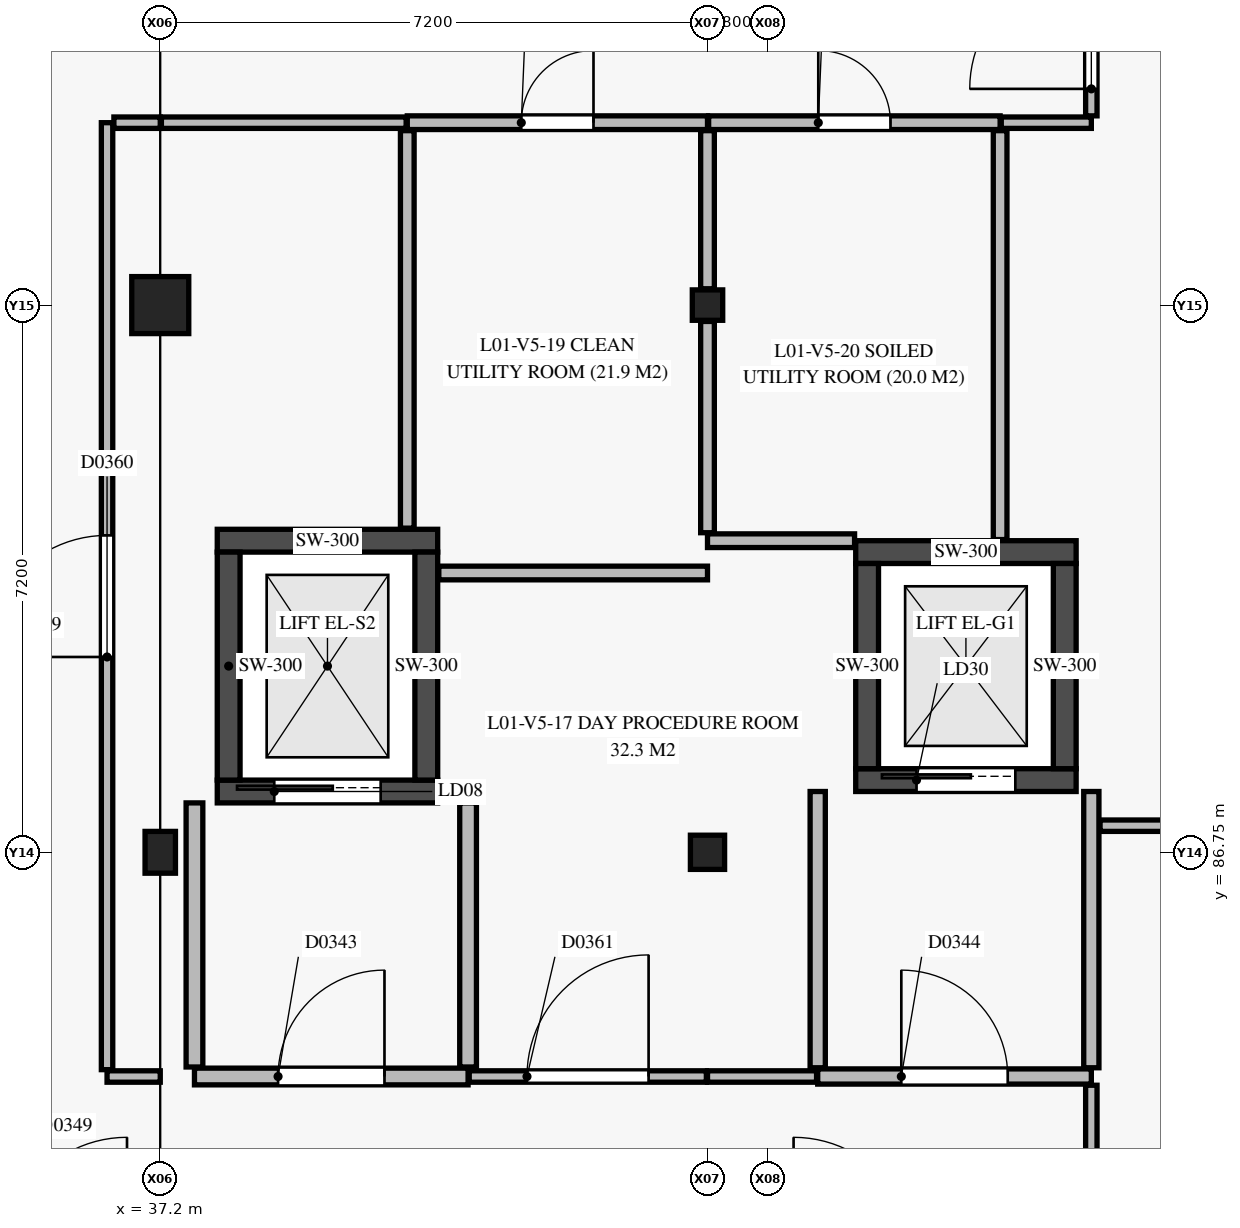
"""IFC4 building model, lengths in metres.
Left out: names, types, materials, properties, quantities, classifications, styles, units other than length and angle.
Written with IfcOpenShell. Run it as: python <this file> out.ifc"""

import sys

from ifc_helpers import new_model, si_unit, direction, frame, frame_2d, origin, origin_2d, place, context, subcontext, project, spatial, rectangle, extrude, element, fill, save


model = new_model("IFC4")
c1 = context("Model", 3, precision=1e-05, world=origin(), true_north=direction((0.0, 1.0)))
c2 = subcontext(c1, "Body", "Model", "MODEL_VIEW")
j1 = project(units=[si_unit("LENGTHUNIT", "METRE"), si_unit("PLANEANGLEUNIT", "RADIAN")], contexts=[c1])
p1 = place(None, origin())
s1 = spatial("IfcSite", under=j1, at=p1, CompositionType="ELEMENT")
p2 = place(p1, origin())
s2 = spatial("IfcBuilding", under=s1, at=p2, CompositionType="ELEMENT")
p3 = place(p2, frame((0.0, 0.0, 4.8)))
s3 = spatial("IfcBuildingStorey", under=s2, at=p3, CompositionType="ELEMENT", Elevation=4.8)
p4 = place(p3, frame((37.2, 86.75, 0.0), z_axis=(0.0, 0.0, 1.0), x_axis=(1.0, 0.0, 0.0)))
e1 = element("IfcColumn", 1, at=p4, inside=s3, PredefinedType="COLUMN", context=c2, shape_type="SweptSolid", body=[
    extrude(rectangle(XDim=0.4, YDim=0.55, at=origin_2d()), origin(), (0.0, 0.0, 1.0), 4.2),
])
p5 = place(p3, frame((37.2, 93.95, 0.0), z_axis=(0.0, 0.0, 1.0), x_axis=(1.0, 0.0, 0.0)))
e2 = element("IfcColumn", 2, at=p5, inside=s3, PredefinedType="COLUMN", context=c2, shape_type="SweptSolid", body=[
    extrude(rectangle(XDim=0.75, YDim=0.75, at=origin_2d()), origin(), (0.0, 0.0, 1.0), 4.2),
])
p6 = place(p3, frame((44.4, 86.75, 0.0), z_axis=(0.0, 0.0, 1.0), x_axis=(1.0, 0.0, 0.0)))
e3 = element("IfcColumn", 3, at=p6, inside=s3, PredefinedType="COLUMN", context=c2, shape_type="SweptSolid", body=[
    extrude(rectangle(XDim=0.45, YDim=0.45, at=origin_2d()), origin(), (0.0, 0.0, 1.0), 4.2),
])
p7 = place(p3, frame((44.4, 93.95, 0.0), z_axis=(0.0, 0.0, 1.0), x_axis=(1.0, 0.0, 0.0)))
e4 = element("IfcColumn", 4, at=p7, inside=s3, PredefinedType="COLUMN", context=c2, shape_type="SweptSolid", body=[
    extrude(rectangle(XDim=0.4, YDim=0.4, at=origin_2d()), origin(), (0.0, 0.0, 1.0), 4.2),
])
p8 = place(p3, frame((37.95, 87.55, 0.0), z_axis=(0.0, 0.0, 1.0), x_axis=(1.0, 0.0, 0.0)))
e5 = element("IfcWall", 5, at=p8, inside=s3, PredefinedType="SHEAR", context=c2, shape_type="SweptSolid", body=[
    extrude(rectangle(XDim=2.9, YDim=0.3, at=frame_2d((1.45, 0.0))), origin(), (0.0, 0.0, 1.0), 3.95),
])
p9 = place(p8, frame((0.75, 0.0, 0.0)))
e6 = element("IfcOpeningElement", 6, at=p9, cuts=e5, PredefinedType="OPENING", context=c2, shape_type="SweptSolid", body=[
    extrude(rectangle(XDim=1.4, YDim=2.15, at=frame_2d((0.7, 1.075))), frame((0.0, 0.16, 0.0), z_axis=(0.0, -1.0, 0.0), x_axis=(1.0, 0.0, 0.0)), (0.0, 0.0, 1.0), 0.32),
])
p10 = place(p3, frame((37.95, 90.85, 0.0), z_axis=(0.0, 0.0, 1.0), x_axis=(1.0, 0.0, 0.0)))
e7 = element("IfcWall", 7, at=p10, inside=s3, PredefinedType="SHEAR", context=c2, shape_type="SweptSolid", body=[
    extrude(rectangle(XDim=2.9, YDim=0.3, at=frame_2d((1.45, 0.0))), origin(), (0.0, 0.0, 1.0), 3.95),
])
for number, where, z_axis, x_axis in (
    (8, (38.1, 87.7, 0.0), (0.0, 0.0, 1.0), (0.0, 1.0, 0.0)),
    (9, (40.7, 87.7, 0.0), (0.0, 0.0, 1.0), (0.0, 1.0, 0.0)),
):
    element("IfcWall", number, at=place(p3, frame(where, z_axis=z_axis, x_axis=x_axis)), inside=s3, PredefinedType="SHEAR", context=c2, shape_type="SweptSolid", body=[
        extrude(rectangle(XDim=3.0, YDim=0.3, at=frame_2d((1.5, 0.0))), origin(), (0.0, 0.0, 1.0), 3.95),
    ])
p11 = place(p3, frame((46.35, 87.7, 0.0), z_axis=(0.0, 0.0, 1.0), x_axis=(1.0, 0.0, 0.0)))
e10 = element("IfcWall", 10, at=p11, inside=s3, PredefinedType="SHEAR", context=c2, shape_type="SweptSolid", body=[
    extrude(rectangle(XDim=2.9, YDim=0.3, at=frame_2d((1.45, 0.0))), origin(), (0.0, 0.0, 1.0), 3.95),
])
p12 = place(p11, frame((0.8, 0.0, 0.0)))
e11 = element("IfcOpeningElement", 11, at=p12, cuts=e10, PredefinedType="OPENING", context=c2, shape_type="SweptSolid", body=[
    extrude(rectangle(XDim=1.3, YDim=2.15, at=frame_2d((0.65, 1.075))), frame((0.0, 0.16, 0.0), z_axis=(0.0, -1.0, 0.0), x_axis=(1.0, 0.0, 0.0)), (0.0, 0.0, 1.0), 0.32),
])
p13 = place(p3, frame((46.35, 90.7, 0.0), z_axis=(0.0, 0.0, 1.0), x_axis=(1.0, 0.0, 0.0)))
e12 = element("IfcWall", 12, at=p13, inside=s3, PredefinedType="SHEAR", context=c2, shape_type="SweptSolid", body=[
    extrude(rectangle(XDim=2.9, YDim=0.3, at=frame_2d((1.45, 0.0))), origin(), (0.0, 0.0, 1.0), 3.95),
])
for number, where, z_axis, x_axis in (
    (13, (46.5, 87.85, 0.0), (0.0, 0.0, 1.0), (0.0, 1.0, 0.0)),
    (14, (49.1, 87.85, 0.0), (0.0, 0.0, 1.0), (0.0, 1.0, 0.0)),
):
    element("IfcWall", number, at=place(p3, frame(where, z_axis=z_axis, x_axis=x_axis)), inside=s3, PredefinedType="SHEAR", context=c2, shape_type="SweptSolid", body=[
        extrude(rectangle(XDim=2.7, YDim=0.3, at=frame_2d((1.35, 0.0))), origin(), (0.0, 0.0, 1.0), 3.95),
    ])
p14 = place(p3, frame((37.65, 83.8, 0.0), z_axis=(0.0, 0.0, 1.0), x_axis=(1.0, 0.0, 0.0)))
e15 = element("IfcWall", 15, at=p14, inside=s3, PredefinedType="PARTITIONING", context=c2, shape_type="SweptSolid", body=[
    extrude(rectangle(XDim=3.6, YDim=0.22, at=frame_2d((1.8, 0.0))), origin(), (0.0, 0.0, 1.0), 3.95),
])
p15 = place(p14, frame((1.1, 0.0, 0.0)))
e16 = element("IfcOpeningElement", 16, at=p15, cuts=e15, PredefinedType="OPENING", context=c2, shape_type="SweptSolid", body=[
    extrude(rectangle(XDim=1.4, YDim=2.2, at=frame_2d((0.7, 1.1))), frame((0.0, 0.12, 0.0), z_axis=(0.0, -1.0, 0.0), x_axis=(1.0, 0.0, 0.0)), (0.0, 0.0, 1.0), 0.24),
])
p16 = place(p3, frame((45.85, 83.8, 0.0), z_axis=(0.0, 0.0, 1.0), x_axis=(1.0, 0.0, 0.0)))
e17 = element("IfcWall", 17, at=p16, inside=s3, PredefinedType="PARTITIONING", context=c2, shape_type="SweptSolid", body=[
    extrude(rectangle(XDim=3.6, YDim=0.2, at=frame_2d((1.8, 0.0))), origin(), (0.0, 0.0, 1.0), 3.95),
])
p17 = place(p16, frame((1.1, 0.0, 0.0)))
e18 = element("IfcOpeningElement", 18, at=p17, cuts=e17, PredefinedType="OPENING", context=c2, shape_type="SweptSolid", body=[
    extrude(rectangle(XDim=1.4, YDim=2.2, at=frame_2d((0.7, 1.1))), frame((0.0, 0.11, 0.0), z_axis=(0.0, -1.0, 0.0), x_axis=(1.0, 0.0, 0.0)), (0.0, 0.0, 1.0), 0.22),
])
for number, where, z_axis, x_axis in (
    (19, (41.25, 83.925, 0.0), (0.0, 0.0, 1.0), (0.0, 1.0, 0.0)),
    (20, (37.65, 83.925, 0.0), (0.0, 0.0, 1.0), (0.0, 1.0, 0.0)),
):
    element("IfcWall", number, at=place(p3, frame(where, z_axis=z_axis, x_axis=x_axis)), inside=s3, PredefinedType="PARTITIONING", context=c2, shape_type="SweptSolid", body=[
        extrude(rectangle(XDim=3.475, YDim=0.22, at=frame_2d((1.737, 0.0))), origin(), (0.0, 0.0, 1.0), 3.135),
    ])
for number, where, z_axis, x_axis in (
    (21, (49.45, 83.915, 0.0), (0.0, 0.0, 1.0), (0.0, 1.0, 0.0)),
    (22, (45.85, 83.915, 0.0), (0.0, 0.0, 1.0), (0.0, 1.0, 0.0)),
):
    element("IfcWall", number, at=place(p3, frame(where, z_axis=z_axis, x_axis=x_axis)), inside=s3, PredefinedType="PARTITIONING", context=c2, shape_type="SweptSolid", body=[
        extrude(rectangle(XDim=3.635, YDim=0.2, at=frame_2d((1.817, 0.0))), origin(), (0.0, 0.0, 1.0), 3.235),
    ])
p18 = place(p3, frame((40.45, 96.35, 0.0), z_axis=(0.0, 0.0, 1.0), x_axis=(1.0, 0.0, 0.0)))
e23 = element("IfcWall", 23, at=p18, inside=s3, PredefinedType="PLUMBINGWALL", context=c2, shape_type="SweptSolid", body=[
    extrude(rectangle(XDim=3.95, YDim=0.18, at=frame_2d((1.975, 0.0))), origin(), (0.0, 0.0, 1.0), 3.235),
])
p19 = place(p18, frame((1.5, 0.0, 0.0)))
e24 = element("IfcOpeningElement", 24, at=p19, cuts=e23, PredefinedType="OPENING", context=c2, shape_type="SweptSolid", body=[
    extrude(rectangle(XDim=0.95, YDim=2.1, at=frame_2d((0.475, 1.05))), frame((0.0, 0.1, 0.0), z_axis=(0.0, -1.0, 0.0), x_axis=(1.0, 0.0, 0.0)), (0.0, 0.0, 1.0), 0.2),
])
p20 = place(p3, frame((44.415, 96.35, 0.0), z_axis=(0.0, 0.0, 1.0), x_axis=(1.0, 0.0, 0.0)))
e25 = element("IfcWall", 25, at=p20, inside=s3, PredefinedType="PLUMBINGWALL", context=c2, shape_type="SweptSolid", body=[
    extrude(rectangle(XDim=3.835, YDim=0.18, at=frame_2d((1.917, 0.0))), origin(), (0.0, 0.0, 1.0), 3.235),
])
p21 = place(p20, frame((1.442, 0.0, 0.0)))
e26 = element("IfcOpeningElement", 26, at=p21, cuts=e25, PredefinedType="OPENING", context=c2, shape_type="SweptSolid", body=[
    extrude(rectangle(XDim=0.95, YDim=2.1, at=frame_2d((0.475, 1.05))), frame((0.0, 0.1, 0.0), z_axis=(0.0, -1.0, 0.0), x_axis=(1.0, 0.0, 0.0)), (0.0, 0.0, 1.0), 0.2),
])
p22 = place(p3, frame((49.45, 81.49, 0.0), z_axis=(0.0, 0.0, 1.0), x_axis=(0.0, 1.0, 0.0)))
e27 = element("IfcWall", 27, at=p22, inside=s3, PredefinedType="PARTITIONING", context=c2, shape_type="SweptSolid", body=[
    extrude(rectangle(XDim=2.195, YDim=0.15, at=frame_2d((1.098, 0.0))), origin(), (0.0, 0.0, 1.0), 3.515),
])
p23 = place(p3, frame((36.5, 83.8, 0.0), z_axis=(0.0, 0.0, 1.0), x_axis=(1.0, 0.0, 0.0)))
e28 = element("IfcWall", 28, at=p23, inside=s3, PredefinedType="PARTITIONING", context=c2, shape_type="SweptSolid", body=[
    extrude(rectangle(XDim=0.7, YDim=0.15, at=frame_2d((0.35, 0.0))), origin(), (0.0, 0.0, 1.0), 3.235),
])
p24 = place(p3, frame((36.5, 83.89, 0.0), z_axis=(0.0, 0.0, 1.0), x_axis=(0.0, 1.0, 0.0)))
e29 = element("IfcWall", 29, at=p24, inside=s3, PredefinedType="PARTITIONING", context=c2, shape_type="SweptSolid", body=[
    extrude(rectangle(XDim=12.46, YDim=0.15, at=frame_2d((6.23, 0.0))), origin(), (0.0, 0.0, 1.0), 3.235),
])
p25 = place(p24, frame((5.43, 0.0, 0.0)))
e30 = element("IfcOpeningElement", 30, at=p25, cuts=e29, PredefinedType="OPENING", context=c2, shape_type="SweptSolid", body=[
    extrude(rectangle(XDim=1.6, YDim=2.25, at=frame_2d((0.8, 1.125))), frame((0.0, 0.085, 0.0), z_axis=(0.0, -1.0, 0.0), x_axis=(1.0, 0.0, 0.0)), (0.0, 0.0, 1.0), 0.17),
])
p26 = place(p3, frame((36.59, 96.35, 0.0), z_axis=(0.0, 0.0, 1.0), x_axis=(1.0, 0.0, 0.0)))
e31 = element("IfcWall", 31, at=p26, inside=s3, PredefinedType="PARTITIONING", context=c2, shape_type="SweptSolid", body=[
    extrude(rectangle(XDim=0.61, YDim=0.15, at=frame_2d((0.305, 0.0))), origin(), (0.0, 0.0, 1.0), 3.355),
])
p27 = place(p3, frame((37.215, 96.35, 0.0), z_axis=(0.0, 0.0, 1.0), x_axis=(1.0, 0.0, 0.0)))
e32 = element("IfcWall", 32, at=p27, inside=s3, PredefinedType="PARTITIONING", context=c2, shape_type="SweptSolid", body=[
    extrude(rectangle(XDim=3.22, YDim=0.15, at=frame_2d((1.61, 0.0))), origin(), (0.0, 0.0, 1.0), 3.355),
])
p28 = place(p3, frame((44.4, 83.8, 0.0), z_axis=(0.0, 0.0, 1.0), x_axis=(1.0, 0.0, 0.0)))
e33 = element("IfcWall", 33, at=p28, inside=s3, PredefinedType="PARTITIONING", context=c2, shape_type="SweptSolid", body=[
    extrude(rectangle(XDim=1.435, YDim=0.15, at=frame_2d((0.718, 0.0))), origin(), (0.0, 0.0, 1.0), 3.385),
])
p29 = place(p3, frame((41.265, 83.8, 0.0), z_axis=(0.0, 0.0, 1.0), x_axis=(1.0, 0.0, 0.0)))
e34 = element("IfcWall", 34, at=p29, inside=s3, PredefinedType="PARTITIONING", context=c2, shape_type="SweptSolid", body=[
    extrude(rectangle(XDim=3.12, YDim=0.15, at=frame_2d((1.56, 0.0))), origin(), (0.0, 0.0, 1.0), 3.385),
])
p30 = place(p29, frame((0.76, 0.0, 0.0)))
e35 = element("IfcOpeningElement", 35, at=p30, cuts=e34, PredefinedType="OPENING", context=c2, shape_type="SweptSolid", body=[
    extrude(rectangle(XDim=1.6, YDim=2.25, at=frame_2d((0.8, 1.125))), frame((0.0, 0.085, 0.0), z_axis=(0.0, -1.0, 0.0), x_axis=(1.0, 0.0, 0.0)), (0.0, 0.0, 1.0), 0.17),
])
p31 = place(p3, frame((48.265, 96.35, 0.0), z_axis=(0.0, 0.0, 1.0), x_axis=(1.0, 0.0, 0.0)))
e36 = element("IfcWall", 36, at=p31, inside=s3, PredefinedType="PARTITIONING", context=c2, shape_type="SweptSolid", body=[
    extrude(rectangle(XDim=1.185, YDim=0.15, at=frame_2d((0.593, 0.0))), origin(), (0.0, 0.0, 1.0), 3.515),
])
p32 = place(p3, frame((49.45, 96.44, 0.0), z_axis=(0.0, 0.0, 1.0), x_axis=(0.0, 1.0, 0.0)))
e37 = element("IfcWall", 37, at=p32, inside=s3, PredefinedType="PARTITIONING", context=c2, shape_type="SweptSolid", body=[
    extrude(rectangle(XDim=2.31, YDim=0.15, at=frame_2d((1.155, 0.0))), origin(), (0.0, 0.0, 1.0), 3.475),
])
p33 = place(p32, frame((0.355, 0.0, 0.0)))
e38 = element("IfcOpeningElement", 38, at=p33, cuts=e37, PredefinedType="OPENING", context=c2, shape_type="SweptSolid", body=[
    extrude(rectangle(XDim=1.6, YDim=2.25, at=frame_2d((0.8, 1.125))), frame((0.0, 0.085, 0.0), z_axis=(0.0, -1.0, 0.0), x_axis=(1.0, 0.0, 0.0)), (0.0, 0.0, 1.0), 0.17),
])
p34 = place(p3, frame((40.45, 91.015, 0.0), z_axis=(0.0, 0.0, 1.0), x_axis=(0.0, 1.0, 0.0)))
e39 = element("IfcWall", 39, at=p34, inside=s3, PredefinedType="PLUMBINGWALL", context=c2, shape_type="SweptSolid", body=[
    extrude(rectangle(XDim=5.23, YDim=0.18, at=frame_2d((2.615, 0.0))), origin(), (0.0, 0.0, 1.0), 3.355),
])
p35 = place(p3, frame((44.4, 90.85, 0.0), z_axis=(0.0, 0.0, 1.0), x_axis=(1.0, 0.0, 0.0)))
e40 = element("IfcWall", 40, at=p35, inside=s3, PredefinedType="PLUMBINGWALL", context=c2, shape_type="SweptSolid", body=[
    extrude(rectangle(XDim=1.935, YDim=0.18, at=frame_2d((0.968, 0.0))), origin(), (0.0, 0.0, 1.0), 3.135),
])
p36 = place(p3, frame((40.865, 90.425, 0.0), z_axis=(0.0, 0.0, 1.0), x_axis=(1.0, 0.0, 0.0)))
e41 = element("IfcWall", 41, at=p36, inside=s3, PredefinedType="PLUMBINGWALL", context=c2, shape_type="SweptSolid", body=[
    extrude(rectangle(XDim=3.535, YDim=0.18, at=frame_2d((1.768, 0.0))), origin(), (0.0, 0.0, 1.0), 3.135),
])
p37 = place(p3, frame((48.25, 90.865, 0.0), z_axis=(0.0, 0.0, 1.0), x_axis=(0.0, 1.0, 0.0)))
e42 = element("IfcWall", 42, at=p37, inside=s3, PredefinedType="PLUMBINGWALL", context=c2, shape_type="SweptSolid", body=[
    extrude(rectangle(XDim=5.38, YDim=0.18, at=frame_2d((2.69, 0.0))), origin(), (0.0, 0.0, 1.0), 3.355),
])
p38 = place(p3, frame((44.4, 90.955, 0.0), z_axis=(0.0, 0.0, 1.0), x_axis=(0.0, 1.0, 0.0)))
e43 = element("IfcWall", 43, at=p38, inside=s3, PredefinedType="PLUMBINGWALL", context=c2, shape_type="SweptSolid", body=[
    extrude(rectangle(XDim=2.78, YDim=0.18, at=frame_2d((1.39, 0.0))), origin(), (0.0, 0.0, 1.0), 3.135),
])
p39 = place(p3, frame((44.4, 94.165, 0.0), z_axis=(0.0, 0.0, 1.0), x_axis=(0.0, 1.0, 0.0)))
e44 = element("IfcWall", 44, at=p39, inside=s3, PredefinedType="PLUMBINGWALL", context=c2, shape_type="SweptSolid", body=[
    extrude(rectangle(XDim=2.08, YDim=0.18, at=frame_2d((1.04, 0.0))), origin(), (0.0, 0.0, 1.0), 3.235),
])
p40 = place(p3, frame((49.565, 87.1, 0.0), z_axis=(0.0, 0.0, 1.0), x_axis=(1.0, 0.0, 0.0)))
e45 = element("IfcWall", 45, at=p40, inside=s3, PredefinedType="PARTITIONING", context=c2, shape_type="SweptSolid", body=[
    extrude(rectangle(XDim=1.72, YDim=0.15, at=frame_2d((0.86, 0.0))), origin(), (0.0, 0.0, 1.0), 3.95),
])
p41 = place(p9, origin())
e46 = element("IfcDoor", 46, at=p41, inside=s3, OperationType="SLIDING_TO_LEFT", PredefinedType="DOOR", context=c2, shape_type="SweptSolid", body=[
    extrude(rectangle(XDim=1.4, YDim=2.15, at=frame_2d((0.7, 1.075))), frame((0.0, 0.025, 0.0), z_axis=(0.0, -1.0, 0.0), x_axis=(1.0, 0.0, 0.0)), (0.0, 0.0, 1.0), 0.05),
])
fill(e6, e46)
p42 = place(p12, origin())
e47 = element("IfcDoor", 47, at=p42, inside=s3, OperationType="SLIDING_TO_LEFT", PredefinedType="DOOR", context=c2, shape_type="SweptSolid", body=[
    extrude(rectangle(XDim=1.3, YDim=2.15, at=frame_2d((0.65, 1.075))), frame((0.0, 0.025, 0.0), z_axis=(0.0, -1.0, 0.0), x_axis=(1.0, 0.0, 0.0)), (0.0, 0.0, 1.0), 0.05),
])
fill(e11, e47)
p43 = place(p15, origin())
e48 = element("IfcDoor", 48, at=p43, inside=s3, OperationType="SINGLE_SWING_RIGHT", PredefinedType="DOOR", context=c2, shape_type="SweptSolid", body=[
    extrude(rectangle(XDim=1.4, YDim=2.2, at=frame_2d((0.7, 1.1))), frame((0.0, 0.025, 0.0), z_axis=(0.0, -1.0, 0.0), x_axis=(1.0, 0.0, 0.0)), (0.0, 0.0, 1.0), 0.05),
])
fill(e16, e48)
p44 = place(p17, origin())
e49 = element("IfcDoor", 49, at=p44, inside=s3, OperationType="SINGLE_SWING_LEFT", PredefinedType="DOOR", context=c2, shape_type="SweptSolid", body=[
    extrude(rectangle(XDim=1.4, YDim=2.2, at=frame_2d((0.7, 1.1))), frame((0.0, 0.025, 0.0), z_axis=(0.0, -1.0, 0.0), x_axis=(1.0, 0.0, 0.0)), (0.0, 0.0, 1.0), 0.05),
])
fill(e18, e49)
p45 = place(p25, origin())
e50 = element("IfcDoor", 50, at=p45, inside=s3, OperationType="SINGLE_SWING_LEFT", PredefinedType="DOOR", context=c2, shape_type="SweptSolid", body=[
    extrude(rectangle(XDim=1.6, YDim=2.25, at=frame_2d((0.8, 1.125))), frame((0.0, 0.025, 0.0), z_axis=(0.0, -1.0, 0.0), x_axis=(1.0, 0.0, 0.0)), (0.0, 0.0, 1.0), 0.05),
])
fill(e30, e50)
p46 = place(p30, origin())
e51 = element("IfcDoor", 51, at=p46, inside=s3, OperationType="SINGLE_SWING_RIGHT", PredefinedType="DOOR", context=c2, shape_type="SweptSolid", body=[
    extrude(rectangle(XDim=1.6, YDim=2.25, at=frame_2d((0.8, 1.125))), frame((0.0, 0.025, 0.0), z_axis=(0.0, -1.0, 0.0), x_axis=(1.0, 0.0, 0.0)), (0.0, 0.0, 1.0), 0.05),
])
fill(e35, e51)
p47 = place(p33, origin())
e52 = element("IfcDoor", 52, at=p47, inside=s3, OperationType="SINGLE_SWING_LEFT", PredefinedType="DOOR", context=c2, shape_type="SweptSolid", body=[
    extrude(rectangle(XDim=1.6, YDim=2.25, at=frame_2d((0.8, 1.125))), frame((0.0, 0.025, 0.0), z_axis=(0.0, -1.0, 0.0), x_axis=(1.0, 0.0, 0.0)), (0.0, 0.0, 1.0), 0.05),
])
fill(e38, e52)
p48 = place(p19, origin())
e53 = element("IfcDoor", 53, at=p48, inside=s3, OperationType="SINGLE_SWING_RIGHT", PredefinedType="DOOR", context=c2, shape_type="SweptSolid", body=[
    extrude(rectangle(XDim=0.95, YDim=2.1, at=frame_2d((0.475, 1.05))), frame((0.0, 0.025, 0.0), z_axis=(0.0, -1.0, 0.0), x_axis=(1.0, 0.0, 0.0)), (0.0, 0.0, 1.0), 0.05),
])
fill(e24, e53)
p49 = place(p21, origin())
e54 = element("IfcDoor", 54, at=p49, inside=s3, OperationType="SINGLE_SWING_LEFT", PredefinedType="DOOR", context=c2, shape_type="SweptSolid", body=[
    extrude(rectangle(XDim=0.95, YDim=2.1, at=frame_2d((0.475, 1.05))), frame((0.0, 0.025, 0.0), z_axis=(0.0, -1.0, 0.0), x_axis=(1.0, 0.0, 0.0)), (0.0, 0.0, 1.0), 0.05),
])
fill(e26, e54)
save(model, sys.argv[1])
